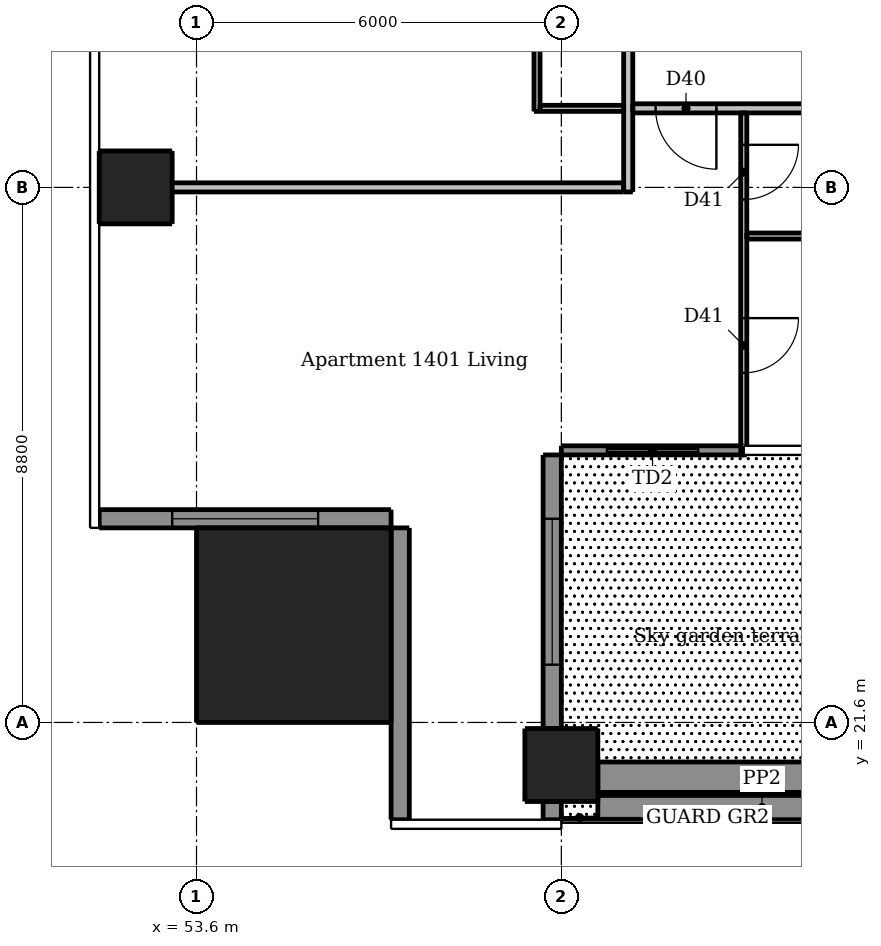
"""IFC4 building model, lengths in metres.
Left out: names, types, materials, properties, quantities, classifications, styles, units other than length and angle.
Written with IfcOpenShell. Run it as: python <this file> out.ifc"""

import sys

from ifc_helpers import new_model, si_unit, direction, frame, frame_2d, origin, origin_2d, place, context, subcontext, project, spatial, rectangle, extrude, element, fill, save


model = new_model("IFC4")
c1 = context("Model", 3, precision=1e-05, world=origin(), true_north=direction((0.0, 1.0)))
c2 = subcontext(c1, "Body", "Model", "MODEL_VIEW")
j1 = project(units=[si_unit("LENGTHUNIT", "METRE"), si_unit("PLANEANGLEUNIT", "RADIAN")], contexts=[c1])
p1 = place(None, origin())
s1 = spatial("IfcSite", under=j1, at=p1, CompositionType="ELEMENT")
p2 = place(p1, origin())
s2 = spatial("IfcBuilding", under=s1, at=p2, CompositionType="ELEMENT")
p3 = place(p2, frame((0.0, 0.0, 53.2)))
s3 = spatial("IfcBuildingStorey", under=s2, at=p3, CompositionType="ELEMENT", Elevation=53.2)
for number, where, z_axis, x_axis in (
    (1, (59.6, 20.9, 0.0), (0.0, 0.0, 1.0), (1.0, 0.0, 0.0)),
    (2, (52.6, 30.4, 0.0), (0.0, 0.0, 1.0), (1.0, 0.0, 0.0)),
):
    element("IfcColumn", number, at=place(p3, frame(where, z_axis=z_axis, x_axis=x_axis)), inside=s3, PredefinedType="COLUMN", context=c2, shape_type="SweptSolid", body=[
        extrude(rectangle(XDim=1.2, YDim=1.2, at=origin_2d()), origin(), (0.0, 0.0, 1.0), 3.05),
    ])
p4 = place(p3, frame((55.2, 23.2, 0.0), z_axis=(0.0, 0.0, 1.0), x_axis=(1.0, 0.0, 0.0)))
e3 = element("IfcColumn", 3, at=p4, inside=s3, PredefinedType="COLUMN", context=c2, shape_type="SweptSolid", body=[
    extrude(rectangle(XDim=3.2, YDim=3.2, at=origin_2d()), origin(), (0.0, 0.0, 1.0), 3.3),
])
p5 = place(p3, frame((59.45, 20.0, 0.0), z_axis=(0.0, 0.0, 1.0), x_axis=(0.0, 1.0, 0.0)))
e4 = element("IfcWall", 4, at=p5, inside=s3, PredefinedType="SOLIDWALL", context=c2, shape_type="SweptSolid", body=[
    extrude(rectangle(XDim=0.3, YDim=0.3, at=frame_2d((0.15, 0.0))), origin(), (0.0, 0.0, 1.0), 3.05),
])
p6 = place(p3, frame((59.45, 21.5, 0.0), z_axis=(0.0, 0.0, 1.0), x_axis=(0.0, 1.0, 0.0)))
e5 = element("IfcWall", 5, at=p6, inside=s3, PredefinedType="SOLIDWALL", context=c2, shape_type="SweptSolid", body=[
    extrude(rectangle(XDim=4.5, YDim=0.3, at=frame_2d((2.25, 0.0))), origin(), (0.0, 0.0, 1.0), 3.05),
])
p7 = place(p6, frame((1.05, 0.0, 0.15)))
e6 = element("IfcOpeningElement", 6, at=p7, cuts=e5, PredefinedType="OPENING", context=c2, shape_type="SweptSolid", body=[
    extrude(rectangle(XDim=2.4, YDim=2.1, at=frame_2d((1.2, 1.05))), frame((0.0, 0.16, 0.0), z_axis=(0.0, -1.0, 0.0), x_axis=(1.0, 0.0, 0.0)), (0.0, 0.0, 1.0), 0.32),
])
p8 = place(p3, frame((52.0, 24.95, 0.0), z_axis=(0.0, 0.0, 1.0), x_axis=(1.0, 0.0, 0.0)))
e7 = element("IfcWall", 7, at=p8, inside=s3, PredefinedType="SOLIDWALL", context=c2, shape_type="SweptSolid", body=[
    extrude(rectangle(XDim=4.8, YDim=0.3, at=frame_2d((2.4, 0.0))), origin(), (0.0, 0.0, 1.0), 3.05),
])
p9 = place(p8, frame((1.2, 0.0, 0.15)))
e8 = element("IfcOpeningElement", 8, at=p9, cuts=e7, PredefinedType="OPENING", context=c2, shape_type="SweptSolid", body=[
    extrude(rectangle(XDim=2.4, YDim=2.1, at=frame_2d((1.2, 1.05))), frame((0.0, 0.16, 0.0), z_axis=(0.0, -1.0, 0.0), x_axis=(1.0, 0.0, 0.0)), (0.0, 0.0, 1.0), 0.32),
])
p10 = place(p3, frame((56.95, 24.8, 0.0), z_axis=(0.0, 0.0, 1.0), x_axis=(0.0, -1.0, 0.0)))
e9 = element("IfcWall", 9, at=p10, inside=s3, PredefinedType="SOLIDWALL", context=c2, shape_type="SweptSolid", body=[
    extrude(rectangle(XDim=4.8, YDim=0.3, at=frame_2d((2.4, 0.0))), origin(), (0.0, 0.0, 1.0), 3.05),
])
p11 = place(p3, frame((59.6, 26.075, 0.0), z_axis=(0.0, 0.0, 1.0), x_axis=(1.0, 0.0, 0.0)))
e10 = element("IfcWall", 10, at=p11, inside=s3, PredefinedType="SOLIDWALL", context=c2, shape_type="SweptSolid", body=[
    extrude(rectangle(XDim=3.0, YDim=0.15, at=frame_2d((1.5, 0.0))), origin(), (0.0, 0.0, 1.0), 3.05),
])
p12 = place(p11, frame((0.75, 0.0, 0.0)))
e11 = element("IfcOpeningElement", 11, at=p12, cuts=e10, PredefinedType="OPENING", context=c2, shape_type="SweptSolid", body=[
    extrude(rectangle(XDim=1.5, YDim=2.4, at=frame_2d((0.75, 1.2))), frame((0.0, 0.085, 0.0), z_axis=(0.0, -1.0, 0.0), x_axis=(1.0, 0.0, 0.0)), (0.0, 0.0, 1.0), 0.17),
])
p13 = place(p3, frame((60.2, 20.2, 0.03), z_axis=(0.0, 0.0, 1.0), x_axis=(1.0, 0.0, 0.0)))
e12 = element("IfcWall", 12, at=p13, inside=s3, PredefinedType="PARAPET", context=c2, shape_type="SweptSolid", body=[
    extrude(rectangle(XDim=5.4, YDim=0.4, at=frame_2d((2.7, 0.0))), origin(), (0.0, 0.0, 1.0), 1.1),
])
p14 = place(p3, frame((60.2, 20.7, 0.03), z_axis=(0.0, 0.0, 1.0), x_axis=(1.0, 0.0, 0.0)))
e13 = element("IfcWall", 13, at=p14, inside=s3, PredefinedType="SOLIDWALL", context=c2, shape_type="SweptSolid", body=[
    extrude(rectangle(XDim=4.8, YDim=0.5, at=frame_2d((2.4, 0.0))), origin(), (0.0, 0.0, 1.0), 0.6),
])
p15 = place(p3, frame((59.2, 31.65, 0.0), z_axis=(0.0, 0.0, 1.0), x_axis=(0.0, 1.0, 0.0)))
e14 = element("IfcWall", 14, at=p15, inside=s3, PredefinedType="PARTITIONING", context=c2, shape_type="SweptSolid", body=[
    extrude(rectangle(XDim=16.675, YDim=0.1, at=frame_2d((8.337, 0.0))), origin(), (0.0, 0.0, 1.0), 3.05),
])
p16 = place(p15, frame((3.45, 0.0, 0.0)))
e15 = element("IfcOpeningElement", 15, at=p16, cuts=e14, PredefinedType="OPENING", context=c2, shape_type="SweptSolid", body=[
    extrude(rectangle(XDim=0.9, YDim=2.1, at=frame_2d((0.45, 1.05))), frame((0.0, 0.06, 0.0), z_axis=(0.0, -1.0, 0.0), x_axis=(1.0, 0.0, 0.0)), (0.0, 0.0, 1.0), 0.12),
])
p17 = place(p15, frame((8.8, 0.0, 0.0)))
e16 = element("IfcOpeningElement", 16, at=p17, cuts=e14, PredefinedType="OPENING", context=c2, shape_type="SweptSolid", body=[
    extrude(rectangle(XDim=0.9, YDim=2.1, at=frame_2d((0.45, 1.05))), frame((0.0, 0.06, 0.0), z_axis=(0.0, -1.0, 0.0), x_axis=(1.0, 0.0, 0.0)), (0.0, 0.0, 1.0), 0.12),
])
p18 = place(p15, frame((14.5, 0.0, 0.0)))
e17 = element("IfcOpeningElement", 17, at=p18, cuts=e14, PredefinedType="OPENING", context=c2, shape_type="SweptSolid", body=[
    extrude(rectangle(XDim=0.9, YDim=2.1, at=frame_2d((0.45, 1.05))), frame((0.0, 0.06, 0.0), z_axis=(0.0, -1.0, 0.0), x_axis=(1.0, 0.0, 0.0)), (0.0, 0.0, 1.0), 0.12),
])
p19 = place(p15, frame((11.55, 0.0, 0.0)))
e18 = element("IfcOpeningElement", 18, at=p19, cuts=e14, PredefinedType="OPENING", context=c2, shape_type="SweptSolid", body=[
    extrude(rectangle(XDim=0.8, YDim=2.1, at=frame_2d((0.4, 1.05))), frame((0.0, 0.06, 0.0), z_axis=(0.0, -1.0, 0.0), x_axis=(1.0, 0.0, 0.0)), (0.0, 0.0, 1.0), 0.12),
])
p20 = place(p3, frame((62.6, 31.625, 0.0), z_axis=(0.0, 0.0, 1.0), x_axis=(0.0, -1.0, 0.0)))
e19 = element("IfcWall", 19, at=p20, inside=s3, PredefinedType="PARTITIONING", context=c2, shape_type="SweptSolid", body=[
    extrude(rectangle(XDim=5.625, YDim=0.1, at=frame_2d((2.812, 0.0))), origin(), (0.0, 0.0, 1.0), 3.05),
])
p21 = place(p20, frame((0.525, 0.0, 0.0)))
e20 = element("IfcOpeningElement", 20, at=p21, cuts=e19, PredefinedType="OPENING", context=c2, shape_type="SweptSolid", body=[
    extrude(rectangle(XDim=0.9, YDim=2.1, at=frame_2d((0.45, 1.05))), frame((0.0, 0.06, 0.0), z_axis=(0.0, -1.0, 0.0), x_axis=(1.0, 0.0, 0.0)), (0.0, 0.0, 1.0), 0.12),
])
p22 = place(p20, frame((3.375, 0.0, 0.0)))
e21 = element("IfcOpeningElement", 21, at=p22, cuts=e19, PredefinedType="OPENING", context=c2, shape_type="SweptSolid", body=[
    extrude(rectangle(XDim=0.9, YDim=2.1, at=frame_2d((0.45, 1.05))), frame((0.0, 0.06, 0.0), z_axis=(0.0, -1.0, 0.0), x_axis=(1.0, 0.0, 0.0)), (0.0, 0.0, 1.0), 0.12),
])
p23 = place(p3, frame((59.25, 31.7, 0.0), z_axis=(0.0, 0.0, 1.0), x_axis=(1.0, 0.0, 0.0)))
e22 = element("IfcWall", 22, at=p23, inside=s3, PredefinedType="PARTITIONING", context=c2, shape_type="SweptSolid", body=[
    extrude(rectangle(XDim=1.375, YDim=0.1, at=frame_2d((0.688, 0.0))), origin(), (0.0, 0.0, 1.0), 3.05),
])
p24 = place(p3, frame((62.65, 29.6, 0.0), z_axis=(0.0, 0.0, 1.0), x_axis=(1.0, 0.0, 0.0)))
e23 = element("IfcWall", 23, at=p24, inside=s3, PredefinedType="PARTITIONING", context=c2, shape_type="SweptSolid", body=[
    extrude(rectangle(XDim=5.875, YDim=0.1, at=frame_2d((2.938, 0.0))), origin(), (0.0, 0.0, 1.0), 3.05),
])
p25 = place(p24, frame((3.75, 0.0, 0.0)))
e24 = element("IfcOpeningElement", 24, at=p25, cuts=e23, PredefinedType="OPENING", context=c2, shape_type="SweptSolid", body=[
    extrude(rectangle(XDim=0.8, YDim=2.1, at=frame_2d((0.4, 1.05))), frame((0.0, 0.06, 0.0), z_axis=(0.0, -1.0, 0.0), x_axis=(1.0, 0.0, 0.0)), (0.0, 0.0, 1.0), 0.12),
])
p26 = place(p3, frame((60.7, 30.325, 0.0), z_axis=(0.0, 0.0, 1.0), x_axis=(0.0, 1.0, 0.0)))
e25 = element("IfcWall", 25, at=p26, inside=s3, PredefinedType="PARTITIONING", context=c2, shape_type="SweptSolid", body=[
    extrude(rectangle(XDim=28.9, YDim=0.15, at=frame_2d((14.45, 0.0))), origin(), (0.0, 0.0, 1.0), 3.05),
])
p27 = place(p26, frame((9.225, 0.0, 0.0)))
e26 = element("IfcOpeningElement", 26, at=p27, cuts=e25, PredefinedType="OPENING", context=c2, shape_type="SweptSolid", body=[
    extrude(rectangle(XDim=1.0, YDim=2.1, at=frame_2d((0.5, 1.05))), frame((0.0, 0.085, 0.0), z_axis=(0.0, -1.0, 0.0), x_axis=(1.0, 0.0, 0.0)), (0.0, 0.0, 1.0), 0.17),
])
p28 = place(p26, frame((26.025, 0.0, 0.0)))
e27 = element("IfcOpeningElement", 27, at=p28, cuts=e25, PredefinedType="OPENING", context=c2, shape_type="SweptSolid", body=[
    extrude(rectangle(XDim=1.0, YDim=2.1, at=frame_2d((0.5, 1.05))), frame((0.0, 0.085, 0.0), z_axis=(0.0, -1.0, 0.0), x_axis=(1.0, 0.0, 0.0)), (0.0, 0.0, 1.0), 0.17),
])
p29 = place(p3, frame((89.525, 31.7, 0.0), z_axis=(0.0, 0.0, 1.0), x_axis=(-1.0, 0.0, 0.0)))
e28 = element("IfcWall", 28, at=p29, inside=s3, PredefinedType="PARTITIONING", context=c2, shape_type="SweptSolid", body=[
    extrude(rectangle(XDim=28.75, YDim=0.15, at=frame_2d((14.375, 0.0))), origin(), (0.0, 0.0, 1.0), 3.05),
])
p30 = place(p29, frame((27.375, 0.0, 0.0)))
e29 = element("IfcOpeningElement", 29, at=p30, cuts=e28, PredefinedType="OPENING", context=c2, shape_type="SweptSolid", body=[
    extrude(rectangle(XDim=1.0, YDim=2.1, at=frame_2d((0.5, 1.05))), frame((0.0, 0.085, 0.0), z_axis=(0.0, -1.0, 0.0), x_axis=(1.0, 0.0, 0.0)), (0.0, 0.0, 1.0), 0.17),
])
p31 = place(p29, frame((12.625, 0.0, 0.0)))
e30 = element("IfcOpeningElement", 30, at=p31, cuts=e28, PredefinedType="OPENING", context=c2, shape_type="SweptSolid", body=[
    extrude(rectangle(XDim=1.0, YDim=2.1, at=frame_2d((0.5, 1.05))), frame((0.0, 0.085, 0.0), z_axis=(0.0, -1.0, 0.0), x_axis=(1.0, 0.0, 0.0)), (0.0, 0.0, 1.0), 0.17),
])
p32 = place(p29, frame((4.225, 0.0, 0.0)))
e31 = element("IfcOpeningElement", 31, at=p32, cuts=e28, PredefinedType="OPENING", context=c2, shape_type="SweptSolid", body=[
    extrude(rectangle(XDim=1.0, YDim=2.1, at=frame_2d((0.5, 1.05))), frame((0.0, 0.085, 0.0), z_axis=(0.0, -1.0, 0.0), x_axis=(1.0, 0.0, 0.0)), (0.0, 0.0, 1.0), 0.17),
])
p33 = place(p3, frame((52.0, 30.4, 0.0), z_axis=(0.0, 0.0, 1.0), x_axis=(1.0, 0.0, 0.0)))
e32 = element("IfcWall", 32, at=p33, inside=s3, PredefinedType="PARTITIONING", context=c2, shape_type="SweptSolid", body=[
    extrude(rectangle(XDim=8.625, YDim=0.15, at=frame_2d((4.312, 0.0))), origin(), (0.0, 0.0, 1.0), 2.647),
])
p34 = place(p7, origin())
e33 = element("IfcWindow", 33, at=p34, inside=s3, PartitioningType="DOUBLE_PANEL_VERTICAL", PredefinedType="WINDOW", context=c2, shape_type="SweptSolid", body=[
    extrude(rectangle(XDim=2.4, YDim=2.1, at=frame_2d((1.2, 1.05))), frame((0.0, 0.03, 0.0), z_axis=(0.0, -1.0, 0.0), x_axis=(1.0, 0.0, 0.0)), (0.0, 0.0, 1.0), 0.06),
])
fill(e6, e33)
p35 = place(p9, origin())
e34 = element("IfcWindow", 34, at=p35, inside=s3, PartitioningType="DOUBLE_PANEL_VERTICAL", PredefinedType="WINDOW", context=c2, shape_type="SweptSolid", body=[
    extrude(rectangle(XDim=2.4, YDim=2.1, at=frame_2d((1.2, 1.05))), frame((0.0, 0.03, 0.0), z_axis=(0.0, -1.0, 0.0), x_axis=(1.0, 0.0, 0.0)), (0.0, 0.0, 1.0), 0.06),
])
fill(e8, e34)
p36 = place(p12, origin())
e35 = element("IfcDoor", 35, at=p36, inside=s3, OperationType="DOUBLE_DOOR_SLIDING", PredefinedType="DOOR", context=c2, shape_type="SweptSolid", body=[
    extrude(rectangle(XDim=1.5, YDim=2.4, at=frame_2d((0.75, 1.2))), frame((0.0, 0.025, 0.0), z_axis=(0.0, -1.0, 0.0), x_axis=(1.0, 0.0, 0.0)), (0.0, 0.0, 1.0), 0.05),
])
fill(e11, e35)
p37 = place(p30, origin())
e36 = element("IfcDoor", 36, at=p37, inside=s3, OperationType="SINGLE_SWING_LEFT", PredefinedType="DOOR", context=c2, shape_type="SweptSolid", body=[
    extrude(rectangle(XDim=1.0, YDim=2.1, at=frame_2d((0.5, 1.05))), frame((0.0, 0.025, 0.0), z_axis=(0.0, -1.0, 0.0), x_axis=(1.0, 0.0, 0.0)), (0.0, 0.0, 1.0), 0.05),
])
fill(e29, e36)
p38 = place(p21, origin())
e37 = element("IfcDoor", 37, at=p38, inside=s3, OperationType="SINGLE_SWING_LEFT", PredefinedType="DOOR", context=c2, shape_type="SweptSolid", body=[
    extrude(rectangle(XDim=0.9, YDim=2.1, at=frame_2d((0.45, 1.05))), frame((0.0, 0.025, 0.0), z_axis=(0.0, -1.0, 0.0), x_axis=(1.0, 0.0, 0.0)), (0.0, 0.0, 1.0), 0.05),
])
fill(e20, e37)
p39 = place(p22, origin())
e38 = element("IfcDoor", 38, at=p39, inside=s3, OperationType="SINGLE_SWING_LEFT", PredefinedType="DOOR", context=c2, shape_type="SweptSolid", body=[
    extrude(rectangle(XDim=0.9, YDim=2.1, at=frame_2d((0.45, 1.05))), frame((0.0, 0.025, 0.0), z_axis=(0.0, -1.0, 0.0), x_axis=(1.0, 0.0, 0.0)), (0.0, 0.0, 1.0), 0.05),
])
fill(e21, e38)
save(model, sys.argv[1])
